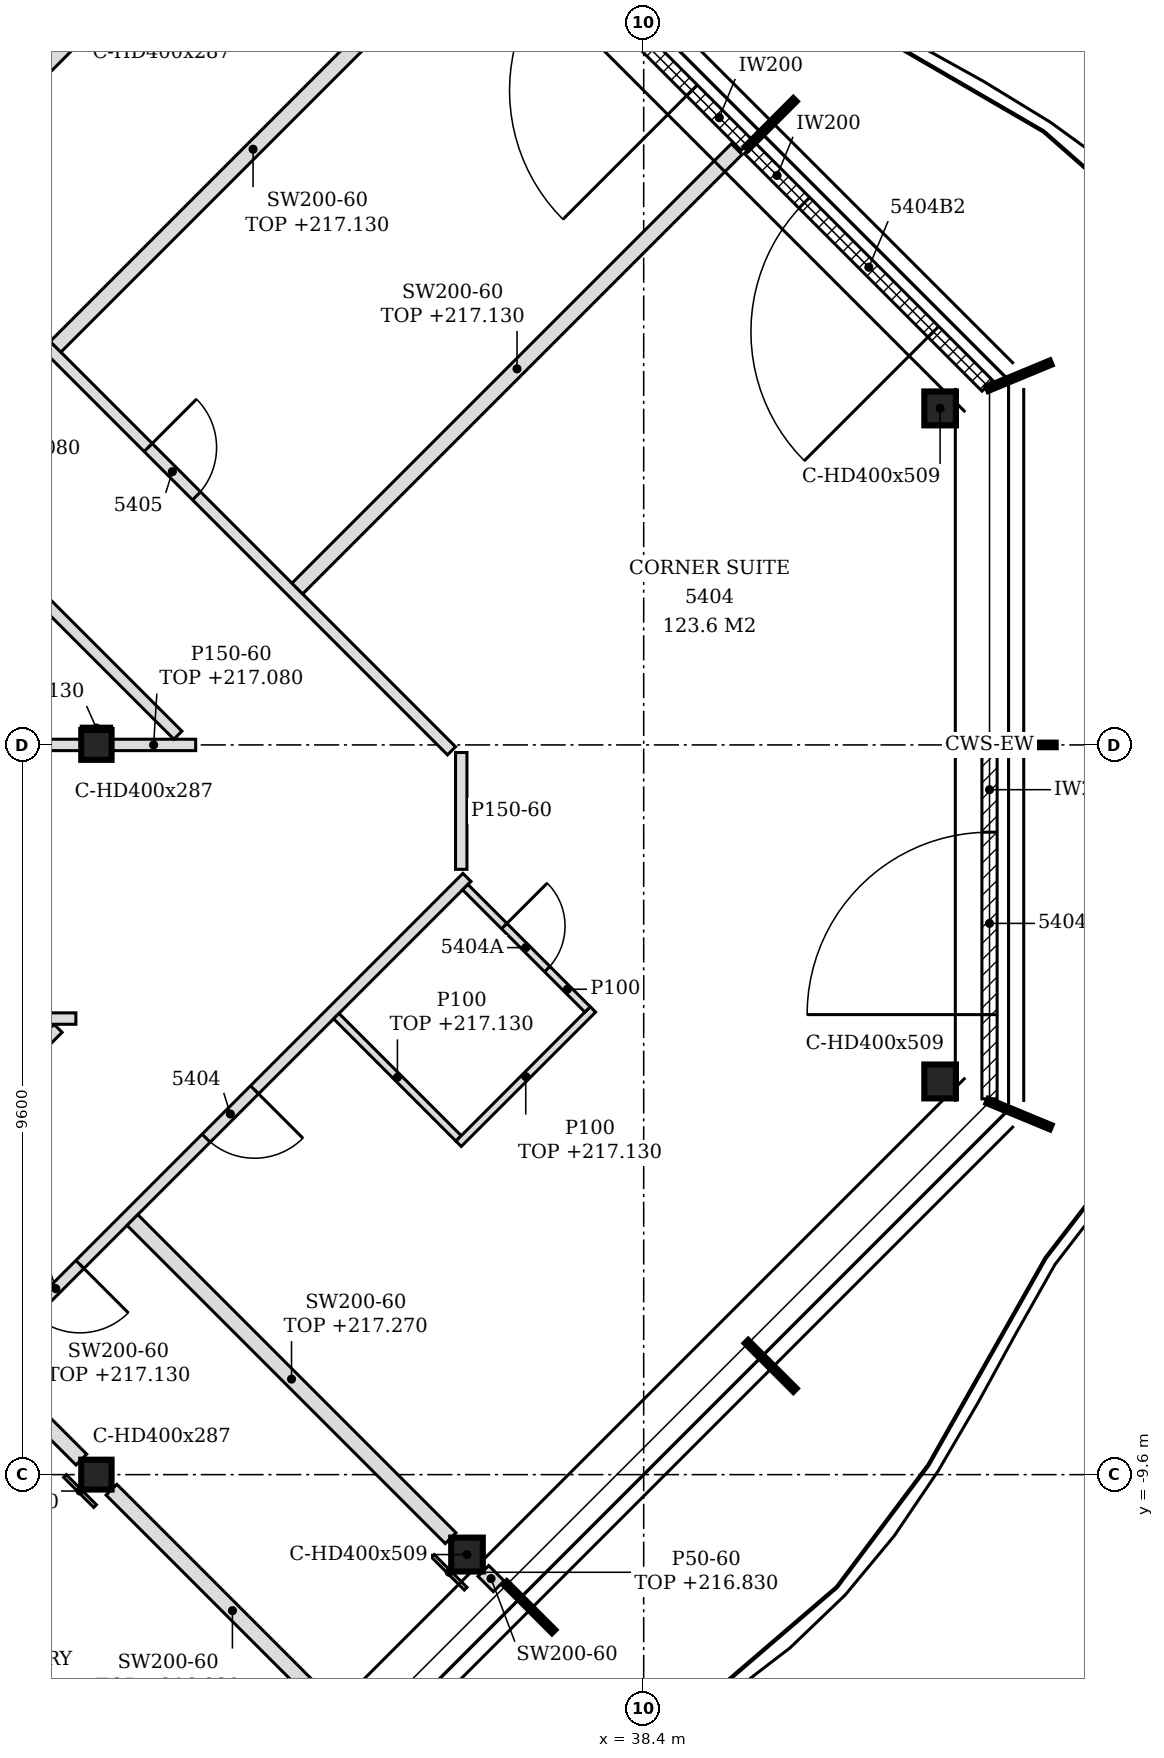
"""IFC4 building model, lengths in metres.
Left out: names, types, materials, properties, quantities, classifications, styles, units other than length and angle.
Written with IfcOpenShell. Run it as: python <this file> out.ifc"""

import sys

from ifc_helpers import new_model, si_unit, direction, frame, frame_2d, origin, origin_2d, place, context, subcontext, project, spatial, polyline, rectangle, i_section, outline, extrude, element, fill, save


model = new_model("IFC4")
c1 = context("Model", 3, precision=1e-05, world=origin(), true_north=direction((0.0, 1.0)))
c2 = subcontext(c1, "Body", "Model", "MODEL_VIEW")
j1 = project(units=[si_unit("LENGTHUNIT", "METRE"), si_unit("PLANEANGLEUNIT", "RADIAN")], contexts=[c1])
p1 = place(None, origin())
s1 = spatial("IfcSite", under=j1, at=p1, CompositionType="ELEMENT")
p2 = place(p1, origin())
s2 = spatial("IfcBuilding", under=s1, at=p2, CompositionType="ELEMENT")
p3 = place(p2, frame((0.0, 0.0, 214.2)))
s3 = spatial("IfcBuildingStorey", under=s2, at=p3, CompositionType="ELEMENT", Elevation=214.2)
for number, where, z_axis, x_axis in (
    (1, (36.076, -10.652, -0.15), (0.0, 0.0, 1.0), (1.0, 0.0, 0.0)),
    (2, (42.3, -4.427, -0.15), (0.0, 0.0, 1.0), (1.0, 0.0, 0.0)),
    (3, (42.3, 4.427, -0.15), (0.0, 0.0, 1.0), (1.0, 0.0, 0.0)),
):
    element("IfcColumn", number, at=place(p3, frame(where, z_axis=z_axis, x_axis=x_axis)), inside=s3, PredefinedType="COLUMN", context=c2, shape_type="SweptSolid", body=[
        extrude(i_section(OverallWidth=0.416, OverallDepth=0.446, WebThickness=0.039, FlangeThickness=0.063, FilletRadius=0.015, at=origin_2d()), origin(), (0.0, 0.0, 1.0), 3.6),
    ])
for number, where, z_axis, x_axis in (
    (4, (31.2, -9.6, -0.15), (0.0, 0.0, 1.0), (1.0, 0.0, 0.0)),
    (5, (31.2, 0.0, -0.15), (0.0, 0.0, 1.0), (1.0, 0.0, 0.0)),
):
    element("IfcColumn", number, at=place(p3, frame(where, z_axis=z_axis, x_axis=x_axis)), inside=s3, PredefinedType="COLUMN", context=c2, shape_type="SweptSolid", body=[
        extrude(i_section(OverallWidth=0.399, OverallDepth=0.393, WebThickness=0.023, FlangeThickness=0.037, FilletRadius=0.015, at=origin_2d()), origin(), (0.0, 0.0, 1.0), 3.6),
    ])
p4 = place(p3, frame((42.95, -4.656, 0.0), z_axis=(0.0, 0.0, 1.0), x_axis=(0.0, 1.0, 0.0)))
e6 = element("IfcWall", 6, at=p4, inside=s3, PredefinedType="NOTDEFINED", context=c2, shape_type="SweptSolid", body=[
    extrude(rectangle(XDim=4.626, YDim=0.2, at=frame_2d((2.313, 0.0))), origin(), (0.0, 0.0, 1.0), 3.45),
])
p5 = place(p4, frame((1.108, 0.0, 0.0)))
e7 = element("IfcOpeningElement", 7, at=p5, cuts=e6, PredefinedType="OPENING", context=c2, shape_type="SweptSolid", body=[
    extrude(rectangle(XDim=2.4, YDim=2.4, at=frame_2d((1.2, 1.2))), frame((0.0, 0.11, 0.0), z_axis=(0.0, -1.0, 0.0), x_axis=(1.0, 0.0, 0.0)), (0.0, 0.0, 1.0), 0.22),
])
p6 = place(p3, frame((42.922, 4.725, 0.0), z_axis=(0.0, 0.0, 1.0), x_axis=(-0.707079168996, 0.707134392299, 0.0)))
e8 = element("IfcWall", 8, at=p6, inside=s3, PredefinedType="NOTDEFINED", context=c2, shape_type="SweptSolid", body=[
    extrude(rectangle(XDim=4.421, YDim=0.2, at=frame_2d((2.21, 0.0))), origin(), (0.0, 0.0, 1.0), 3.45),
])
p7 = place(p6, frame((1.005, 0.0, 0.0)))
e9 = element("IfcOpeningElement", 9, at=p7, cuts=e8, PredefinedType="OPENING", context=c2, shape_type="SweptSolid", body=[
    extrude(rectangle(XDim=2.4, YDim=2.4, at=frame_2d((1.2, 1.2))), frame((0.0, 0.11, 0.0), z_axis=(0.0, -1.0, 0.0), x_axis=(1.0, 0.0, 0.0)), (0.0, 0.0, 1.0), 0.22),
])
p8 = place(p3, frame((39.753, 7.893, 0.0), z_axis=(0.0, 0.0, 1.0), x_axis=(-0.707106781187, 0.707106781187, 0.0)))
e10 = element("IfcWall", 10, at=p8, inside=s3, PredefinedType="NOTDEFINED", context=c2, shape_type="SweptSolid", body=[
    extrude(rectangle(XDim=4.431, YDim=0.2, at=frame_2d((2.215, 0.0))), origin(), (0.0, 0.0, 1.0), 3.45),
])
p9 = place(p8, frame((1.016, 0.0, 0.0)))
e11 = element("IfcOpeningElement", 11, at=p9, cuts=e10, PredefinedType="OPENING", context=c2, shape_type="SweptSolid", body=[
    extrude(rectangle(XDim=2.4, YDim=2.4, at=frame_2d((1.2, 1.2))), frame((0.0, 0.11, 0.0), z_axis=(0.0, -1.0, 0.0), x_axis=(1.0, 0.0, 0.0)), (0.0, 0.0, 1.0), 0.22),
])
p10 = place(p3, frame((21.146, -16.672, 0.0), z_axis=(0.0, 0.0, 1.0), x_axis=(0.707100999376, 0.70711256295, 0.0)))
e12 = element("IfcWall", 12, at=p10, inside=s3, PredefinedType="PARTITIONING", context=c2, shape_type="SweptSolid", body=[
    extrude(rectangle(XDim=21.113, YDim=0.15, at=frame_2d((10.556, 0.0))), origin(), (0.0, 0.0, 1.0), 2.88),
])
p11 = place(p10, frame((2.466, 0.0, 0.0)))
e13 = element("IfcOpeningElement", 13, at=p11, cuts=e12, PredefinedType="OPENING", context=c2, shape_type="SweptSolid", body=[
    extrude(rectangle(XDim=0.9, YDim=2.1, at=frame_2d((0.45, 1.05))), frame((0.0, 0.085, 0.0), z_axis=(0.0, -1.0, 0.0), x_axis=(1.0, 0.0, 0.0)), (0.0, 0.0, 1.0), 0.17),
])
p12 = place(p10, frame((8.611, 0.0, 0.0)))
e14 = element("IfcOpeningElement", 14, at=p12, cuts=e12, PredefinedType="OPENING", context=c2, shape_type="SweptSolid", body=[
    extrude(rectangle(XDim=0.9, YDim=2.1, at=frame_2d((0.45, 1.05))), frame((0.0, 0.085, 0.0), z_axis=(0.0, -1.0, 0.0), x_axis=(1.0, 0.0, 0.0)), (0.0, 0.0, 1.0), 0.17),
])
p13 = place(p10, frame((13.012, 0.0, 0.0)))
e15 = element("IfcOpeningElement", 15, at=p13, cuts=e12, PredefinedType="OPENING", context=c2, shape_type="SweptSolid", body=[
    extrude(rectangle(XDim=0.9, YDim=2.1, at=frame_2d((0.45, 1.05))), frame((0.0, 0.085, 0.0), z_axis=(0.0, -1.0, 0.0), x_axis=(1.0, 0.0, 0.0)), (0.0, 0.0, 1.0), 0.17),
])
p14 = place(p10, frame((16.261, 0.0, 0.0)))
e16 = element("IfcOpeningElement", 16, at=p14, cuts=e12, PredefinedType="OPENING", context=c2, shape_type="SweptSolid", body=[
    extrude(rectangle(XDim=0.9, YDim=2.1, at=frame_2d((0.45, 1.05))), frame((0.0, 0.085, 0.0), z_axis=(0.0, -1.0, 0.0), x_axis=(1.0, 0.0, 0.0)), (0.0, 0.0, 1.0), 0.17),
])
p15 = place(p3, frame((34.581, -12.981, 0.0), z_axis=(0.0, 0.0, 1.0), x_axis=(-0.707133900936, 0.707079660397, 0.0)))
e17 = element("IfcWall", 17, at=p15, inside=s3, PredefinedType="PARTITIONING", context=c2, shape_type="SweptSolid", body=[
    extrude(rectangle(XDim=4.501, YDim=0.2, at=frame_2d((2.25, 0.0))), origin(), (0.0, 0.0, 1.0), 2.63),
])
p16 = place(p3, frame((36.493, -11.069, 0.0), z_axis=(0.0, 0.0, 1.0), x_axis=(-0.707534423513, 0.706678880075, 0.0)))
e18 = element("IfcWall", 18, at=p16, inside=s3, PredefinedType="PARTITIONING", context=c2, shape_type="SweptSolid", body=[
    extrude(rectangle(XDim=0.285, YDim=0.2, at=frame_2d((0.143, 0.0))), origin(), (0.0, 0.0, 1.0), 3.45),
])
p17 = place(p3, frame((35.86, -10.436, 0.0), z_axis=(0.0, 0.0, 1.0), x_axis=(-0.707106781187, 0.707106781187, 0.0)))
e19 = element("IfcWall", 19, at=p17, inside=s3, PredefinedType="PARTITIONING", context=c2, shape_type="SweptSolid", body=[
    extrude(rectangle(XDim=5.92, YDim=0.2, at=frame_2d((2.96, 0.0))), origin(), (0.0, 0.0, 1.0), 3.07),
])
p18 = place(p3, frame((31.002, -9.402, 0.0), z_axis=(0.0, 0.0, 1.0), x_axis=(-0.707106781187, 0.707106781187, 0.0)))
e20 = element("IfcWall", 20, at=p18, inside=s3, PredefinedType="PARTITIONING", context=c2, shape_type="SweptSolid", body=[
    extrude(rectangle(XDim=1.754, YDim=0.2, at=frame_2d((0.877, 0.0))), origin(), (0.0, 0.0, 1.0), 2.93),
])
p19 = place(p3, frame((26.151, -8.272, 0.0), z_axis=(0.0, 0.0, 1.0), x_axis=(0.707163762272, 0.707049795509, 0.0)))
e21 = element("IfcWall", 21, at=p19, inside=s3, PredefinedType="PARTITIONING", context=c2, shape_type="SweptSolid", body=[
    extrude(rectangle(XDim=6.427, YDim=0.15, at=frame_2d((3.213, 0.0))), origin(), (0.0, 0.0, 1.0), 2.88),
])
p20 = place(p3, frame((35.965, -5.177, 0.0), z_axis=(0.0, 0.0, 1.0), x_axis=(-0.707160441348, 0.707053116953, 0.0)))
e22 = element("IfcWall", 22, at=p20, inside=s3, PredefinedType="PARTITIONING", context=c2, shape_type="SweptSolid", body=[
    extrude(rectangle(XDim=2.275, YDim=0.1, at=frame_2d((1.137, 0.0))), origin(), (0.0, 0.0, 1.0), 2.93),
])
p21 = place(p3, frame((35.965, -5.247, 0.0), z_axis=(0.0, 0.0, 1.0), x_axis=(0.707155609469, 0.707057949532, 0.0)))
e23 = element("IfcWall", 23, at=p21, inside=s3, PredefinedType="PARTITIONING", context=c2, shape_type="SweptSolid", body=[
    extrude(rectangle(XDim=2.5, YDim=0.1, at=frame_2d((1.25, 0.0))), origin(), (0.0, 0.0, 1.0), 2.93),
])
p22 = place(p3, frame((19.125, -3.6, 0.0), z_axis=(0.0, 0.0, 1.0), x_axis=(1.0, 0.0, 0.0)))
e24 = element("IfcWall", 24, at=p22, inside=s3, PredefinedType="PARTITIONING", context=c2, shape_type="SweptSolid", body=[
    extrude(outline(polyline([(0.0, 0.0), (11.805, 0.0), (11.805, 3.45), (0.225, 3.45), (0.223, 2.83), (0.0, 2.83), (0.0, 0.0)])), frame((0.0, 0.075, 0.0), z_axis=(0.0, -1.0, 0.0), x_axis=(1.0, 0.0, 0.0)), (0.0, 0.0, 1.0), 0.15),
])
p23 = place(p22, frame((5.437, 0.0, 0.0)))
e25 = element("IfcOpeningElement", 25, at=p23, cuts=e24, PredefinedType="OPENING", context=c2, shape_type="SweptSolid", body=[
    extrude(rectangle(XDim=0.9, YDim=2.1, at=frame_2d((0.45, 1.05))), frame((0.0, 0.085, 0.0), z_axis=(0.0, -1.0, 0.0), x_axis=(1.0, 0.0, 0.0)), (0.0, 0.0, 1.0), 0.17),
])
p24 = place(p3, frame((37.662, -3.479, 0.0), z_axis=(0.0, 0.0, 1.0), x_axis=(-0.707160441348, 0.707053116953, 0.0)))
e26 = element("IfcWall", 26, at=p24, inside=s3, PredefinedType="PARTITIONING", context=c2, shape_type="SweptSolid", body=[
    extrude(rectangle(XDim=2.275, YDim=0.1, at=frame_2d((1.137, 0.0))), origin(), (0.0, 0.0, 1.0), 3.45),
])
p25 = place(p24, frame((0.75, 0.0, 0.0)))
e27 = element("IfcOpeningElement", 27, at=p25, cuts=e26, PredefinedType="OPENING", context=c2, shape_type="SweptSolid", body=[
    extrude(rectangle(XDim=0.8, YDim=2.1, at=frame_2d((0.4, 1.05))), frame((0.0, 0.06, 0.0), z_axis=(0.0, -1.0, 0.0), x_axis=(1.0, 0.0, 0.0)), (0.0, 0.0, 1.0), 0.12),
])
p26 = place(p3, frame((36.0, -1.637, 0.0), z_axis=(0.0, 0.0, 1.0), x_axis=(0.0, 1.0, 0.0)))
e28 = element("IfcWall", 28, at=p26, inside=s3, PredefinedType="PARTITIONING", context=c2, shape_type="SweptSolid", body=[
    extrude(outline(polyline([(0.0, 0.0), (1.537, 0.0), (1.537, 2.88), (1.532, 2.88), (1.53, 3.45), (0.0, 3.45), (0.0, 0.0)])), frame((0.0, 0.075, 0.0), z_axis=(0.0, -1.0, 0.0), x_axis=(1.0, 0.0, 0.0)), (0.0, 0.0, 1.0), 0.15),
])
p27 = place(p3, frame((35.872, -0.078, 0.0), z_axis=(0.0, 0.0, 1.0), x_axis=(-0.707113345155, 0.707100217157, 0.0)))
e29 = element("IfcWall", 29, at=p27, inside=s3, PredefinedType="PARTITIONING", context=c2, shape_type="SweptSolid", body=[
    extrude(rectangle(XDim=18.597, YDim=0.15, at=frame_2d((9.298, 0.0))), origin(), (0.0, 0.0, 1.0), 2.88),
])
p28 = place(p27, frame((4.744, 0.0, 0.0)))
e30 = element("IfcOpeningElement", 30, at=p28, cuts=e29, PredefinedType="OPENING", context=c2, shape_type="SweptSolid", body=[
    extrude(rectangle(XDim=0.9, YDim=2.1, at=frame_2d((0.45, 1.05))), frame((0.0, 0.085, 0.0), z_axis=(0.0, -1.0, 0.0), x_axis=(1.0, 0.0, 0.0)), (0.0, 0.0, 1.0), 0.17),
])
p29 = place(p27, frame((8.345, 0.0, 0.0)))
e31 = element("IfcOpeningElement", 31, at=p29, cuts=e29, PredefinedType="OPENING", context=c2, shape_type="SweptSolid", body=[
    extrude(rectangle(XDim=0.9, YDim=2.1, at=frame_2d((0.45, 1.05))), frame((0.0, 0.085, 0.0), z_axis=(0.0, -1.0, 0.0), x_axis=(1.0, 0.0, 0.0)), (0.0, 0.0, 1.0), 0.17),
])
p30 = place(p27, frame((12.746, 0.0, 0.0)))
e32 = element("IfcOpeningElement", 32, at=p30, cuts=e29, PredefinedType="OPENING", context=c2, shape_type="SweptSolid", body=[
    extrude(rectangle(XDim=0.9, YDim=2.1, at=frame_2d((0.45, 1.05))), frame((0.0, 0.085, 0.0), z_axis=(0.0, -1.0, 0.0), x_axis=(1.0, 0.0, 0.0)), (0.0, 0.0, 1.0), 0.17),
])
p31 = place(p3, frame((19.125, 0.0, 0.0), z_axis=(0.0, 0.0, 1.0), x_axis=(1.0, 0.0, 0.0)))
e33 = element("IfcWall", 33, at=p31, inside=s3, PredefinedType="PARTITIONING", context=c2, shape_type="SweptSolid", body=[
    extrude(outline(polyline([(0.0, 0.0), (11.875, 0.0), (11.875, 2.88), (0.225, 2.88), (0.223, 2.83), (0.0, 2.83), (0.0, 0.0)])), frame((0.0, 0.075, 0.0), z_axis=(0.0, -1.0, 0.0), x_axis=(1.0, 0.0, 0.0)), (0.0, 0.0, 1.0), 0.15),
])
p32 = place(p3, frame((31.399, 0.0, 0.0), z_axis=(0.0, 0.0, 1.0), x_axis=(1.0, 0.0, 0.0)))
e34 = element("IfcWall", 34, at=p32, inside=s3, PredefinedType="PARTITIONING", context=c2, shape_type="SweptSolid", body=[
    extrude(rectangle(XDim=1.107, YDim=0.15, at=frame_2d((0.553, 0.0))), origin(), (0.0, 0.0, 1.0), 2.88),
])
p33 = place(p3, frame((32.272, 0.128, 0.0), z_axis=(0.0, 0.0, 1.0), x_axis=(-0.707106781187, 0.707106781187, 0.0)))
e35 = element("IfcWall", 35, at=p33, inside=s3, PredefinedType="PARTITIONING", context=c2, shape_type="SweptSolid", body=[
    extrude(rectangle(XDim=18.207, YDim=0.15, at=frame_2d((9.103, 0.0))), origin(), (0.0, 0.0, 1.0), 2.88),
])
p34 = place(p33, frame((8.703, 0.0, 0.0)))
e36 = element("IfcOpeningElement", 36, at=p34, cuts=e35, PredefinedType="OPENING", context=c2, shape_type="SweptSolid", body=[
    extrude(rectangle(XDim=0.9, YDim=2.1, at=frame_2d((0.45, 1.05))), frame((0.0, 0.085, 0.0), z_axis=(0.0, -1.0, 0.0), x_axis=(1.0, 0.0, 0.0)), (0.0, 0.0, 1.0), 0.17),
])
p35 = place(p3, frame((33.843, 2.057, 0.0), z_axis=(0.0, 0.0, 1.0), x_axis=(0.70709185088, 0.707121711178, 0.0)))
e37 = element("IfcWall", 37, at=p35, inside=s3, PredefinedType="PARTITIONING", context=c2, shape_type="SweptSolid", body=[
    extrude(rectangle(XDim=8.176, YDim=0.2, at=frame_2d((4.088, 0.0))), origin(), (0.0, 0.0, 1.0), 2.93),
])
p36 = place(p3, frame((30.662, 5.238, 0.0), z_axis=(0.0, 0.0, 1.0), x_axis=(0.707106781187, 0.707106781187, 0.0)))
e38 = element("IfcWall", 38, at=p36, inside=s3, PredefinedType="PARTITIONING", context=c2, shape_type="SweptSolid", body=[
    extrude(rectangle(XDim=7.351, YDim=0.2, at=frame_2d((3.676, 0.0))), origin(), (0.0, 0.0, 1.0), 2.93),
])
p37 = place(p3, frame((28.75, 7.15, 0.0), z_axis=(0.0, 0.0, 1.0), x_axis=(0.7070684525, 0.707145107796, 0.0)))
e39 = element("IfcWall", 39, at=p37, inside=s3, PredefinedType="PARTITIONING", context=c2, shape_type="SweptSolid", body=[
    extrude(rectangle(XDim=3.185, YDim=0.2, at=frame_2d((1.592, 0.0))), origin(), (0.0, 0.0, 1.0), 2.93),
])
p38 = place(p3, frame((31.182, -10.014, 0.0), z_axis=(0.0, 0.0, 1.0), x_axis=(-0.707106781187, 0.707106781187, 0.0)))
e40 = element("IfcWall", 40, at=p38, inside=s3, PredefinedType="PARTITIONING", context=c2, shape_type="SweptSolid", body=[
    extrude(rectangle(XDim=0.56, YDim=0.05, at=frame_2d((0.28, 0.0))), origin(), (0.0, 0.0, 1.0), 2.88),
])
p39 = place(p3, frame((36.058, -11.1, 0.0), z_axis=(0.0, 0.0, 1.0), x_axis=(-0.707307009627, 0.706906496032, 0.0)))
e41 = element("IfcWall", 41, at=p39, inside=s3, PredefinedType="PARTITIONING", context=c2, shape_type="SweptSolid", body=[
    extrude(rectangle(XDim=0.61, YDim=0.05, at=frame_2d((0.305, 0.0))), origin(), (0.0, 0.0, 1.0), 2.63),
])
p40 = place(p3, frame((31.0, 0.221, 0.0), z_axis=(0.0, 0.0, 1.0), x_axis=(1.0, 0.0, 0.0)))
e42 = element("IfcWall", 42, at=p40, inside=s3, PredefinedType="PARTITIONING", context=c2, shape_type="SweptSolid", body=[
    extrude(rectangle(XDim=0.399, YDim=0.05, at=frame_2d((0.199, 0.0))), origin(), (0.0, 0.0, 1.0), 2.93),
])
p41 = place(p5, origin())
e43 = element("IfcDoor", 43, at=p41, inside=s3, OperationType="SINGLE_SWING_LEFT", PredefinedType="DOOR", context=c2, shape_type="SweptSolid", body=[
    extrude(rectangle(XDim=2.4, YDim=2.4, at=frame_2d((1.2, 1.2))), frame((0.0, 0.025, 0.0), z_axis=(0.0, -1.0, 0.0), x_axis=(1.0, 0.0, 0.0)), (0.0, 0.0, 1.0), 0.05),
])
fill(e7, e43)
p42 = place(p7, origin())
e44 = element("IfcDoor", 44, at=p42, inside=s3, OperationType="SINGLE_SWING_LEFT", PredefinedType="DOOR", context=c2, shape_type="SweptSolid", body=[
    extrude(rectangle(XDim=2.4, YDim=2.4, at=frame_2d((1.2, 1.2))), frame((0.0, 0.025, 0.0), z_axis=(0.0, -1.0, 0.0), x_axis=(1.0, 0.0, 0.0)), (0.0, 0.0, 1.0), 0.05),
])
fill(e9, e44)
p43 = place(p9, origin())
e45 = element("IfcDoor", 45, at=p43, inside=s3, OperationType="SINGLE_SWING_LEFT", PredefinedType="DOOR", context=c2, shape_type="SweptSolid", body=[
    extrude(rectangle(XDim=2.4, YDim=2.4, at=frame_2d((1.2, 1.2))), frame((0.0, 0.025, 0.0), z_axis=(0.0, -1.0, 0.0), x_axis=(1.0, 0.0, 0.0)), (0.0, 0.0, 1.0), 0.05),
])
fill(e11, e45)
p44 = place(p13, frame((0.9, 0.0, 0.0), z_axis=(0.0, 0.0, 1.0), x_axis=(-1.0, 0.0, 0.0)))
e46 = element("IfcDoor", 46, at=p44, inside=s3, OperationType="SINGLE_SWING_LEFT", PredefinedType="DOOR", context=c2, shape_type="SweptSolid", body=[
    extrude(rectangle(XDim=0.9, YDim=2.1, at=frame_2d((0.45, 1.05))), frame((0.0, 0.025, 0.0), z_axis=(0.0, -1.0, 0.0), x_axis=(1.0, 0.0, 0.0)), (0.0, 0.0, 1.0), 0.05),
])
fill(e15, e46)
p45 = place(p14, frame((0.9, 0.0, 0.0), z_axis=(0.0, 0.0, 1.0), x_axis=(-1.0, 0.0, 0.0)))
e47 = element("IfcDoor", 47, at=p45, inside=s3, OperationType="SINGLE_SWING_LEFT", PredefinedType="DOOR", context=c2, shape_type="SweptSolid", body=[
    extrude(rectangle(XDim=0.9, YDim=2.1, at=frame_2d((0.45, 1.05))), frame((0.0, 0.025, 0.0), z_axis=(0.0, -1.0, 0.0), x_axis=(1.0, 0.0, 0.0)), (0.0, 0.0, 1.0), 0.05),
])
fill(e16, e47)
p46 = place(p25, frame((0.8, 0.0, 0.0), z_axis=(0.0, 0.0, 1.0), x_axis=(-1.0, 0.0, 0.0)))
e48 = element("IfcDoor", 48, at=p46, inside=s3, OperationType="SINGLE_SWING_LEFT", PredefinedType="DOOR", context=c2, shape_type="SweptSolid", body=[
    extrude(rectangle(XDim=0.8, YDim=2.1, at=frame_2d((0.4, 1.05))), frame((0.0, 0.025, 0.0), z_axis=(0.0, -1.0, 0.0), x_axis=(1.0, 0.0, 0.0)), (0.0, 0.0, 1.0), 0.05),
])
fill(e27, e48)
p47 = place(p28, frame((0.9, 0.0, 0.0), z_axis=(0.0, 0.0, 1.0), x_axis=(-1.0, 0.0, 0.0)))
e49 = element("IfcDoor", 49, at=p47, inside=s3, OperationType="SINGLE_SWING_LEFT", PredefinedType="DOOR", context=c2, shape_type="SweptSolid", body=[
    extrude(rectangle(XDim=0.9, YDim=2.1, at=frame_2d((0.45, 1.05))), frame((0.0, 0.025, 0.0), z_axis=(0.0, -1.0, 0.0), x_axis=(1.0, 0.0, 0.0)), (0.0, 0.0, 1.0), 0.05),
])
fill(e30, e49)
save(model, sys.argv[1])
